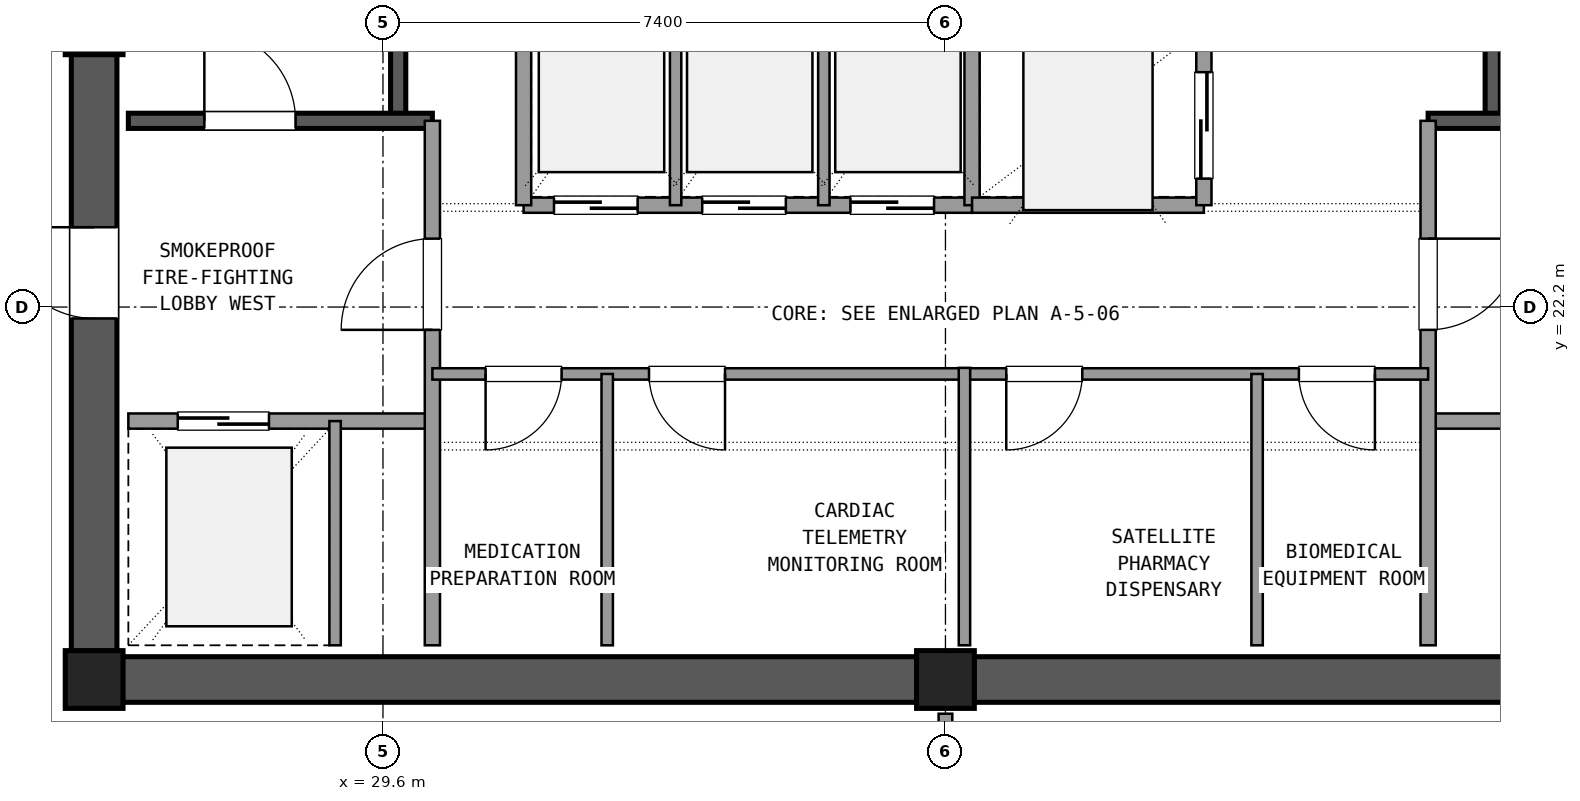
"""IFC4 building model, lengths in metres.
Left out: names, types, materials, properties, quantities, classifications, styles, units other than length and angle.
Written with IfcOpenShell. Run it as: python <this file> out.ifc"""

import sys

from ifc_helpers import new_model, si_unit, direction, frame, frame_2d, origin, origin_2d, place, context, subcontext, project, spatial, rectangle, extrude, element, fill, save


model = new_model("IFC4")
c1 = context("Model", 3, precision=1e-05, world=origin(), true_north=direction((0.0, 1.0)))
c2 = subcontext(c1, "Body", "Model", "MODEL_VIEW")
j1 = project(units=[si_unit("LENGTHUNIT", "METRE"), si_unit("PLANEANGLEUNIT", "RADIAN")], contexts=[c1])
p1 = place(None, origin())
s1 = spatial("IfcSite", under=j1, at=p1, CompositionType="ELEMENT")
p2 = place(p1, origin())
s2 = spatial("IfcBuilding", under=s1, at=p2, CompositionType="ELEMENT")
p3 = place(p2, frame((0.0, 0.0, 282.42)))
s3 = spatial("IfcBuildingStorey", under=s2, at=p3, CompositionType="ELEMENT", Elevation=282.42)
for number, where, z_axis, x_axis in (
    (1, (25.8, 17.3, 0.0), (0.0, 0.0, 1.0), (1.0, 0.0, 0.0)),
    (2, (37.0, 17.3, 0.0), (0.0, 0.0, 1.0), (1.0, 0.0, 0.0)),
    (3, (25.8, 25.9, 0.0), (0.0, 0.0, 1.0), (1.0, 0.0, 0.0)),
):
    element("IfcColumn", number, at=place(p3, frame(where, z_axis=z_axis, x_axis=x_axis)), inside=s3, PredefinedType="COLUMN", context=c2, shape_type="SweptSolid", body=[
        extrude(rectangle(XDim=0.76, YDim=0.76, at=origin_2d()), origin(), (0.0, 0.0, 1.0), 3.6),
    ])
for number, where, z_axis, x_axis in (
    (4, (26.175, 17.3, 0.0), (0.0, 0.0, 1.0), (1.0, 0.0, 0.0)),
    (5, (37.375, 17.3, 0.0), (0.0, 0.0, 1.0), (1.0, 0.0, 0.0)),
):
    element("IfcWall", number, at=place(p3, frame(where, z_axis=z_axis, x_axis=x_axis)), inside=s3, PredefinedType="SHEAR", context=c2, shape_type="SweptSolid", body=[
        extrude(rectangle(XDim=10.45, YDim=0.6, at=frame_2d((5.225, 0.0))), origin(), (0.0, 0.0, 1.0), 3.32),
    ])
p4 = place(p3, frame((25.8, 25.525, 0.0), z_axis=(0.0, 0.0, 1.0), x_axis=(0.0, -1.0, 0.0)))
e6 = element("IfcWall", 6, at=p4, inside=s3, PredefinedType="SHEAR", context=c2, shape_type="SweptSolid", body=[
    extrude(rectangle(XDim=7.85, YDim=0.6, at=frame_2d((3.925, 0.0))), origin(), (0.0, 0.0, 1.0), 3.32),
])
p5 = place(p4, frame((2.275, 0.0, 0.0)))
e7 = element("IfcOpeningElement", 7, at=p5, cuts=e6, PredefinedType="OPENING", context=c2, shape_type="SweptSolid", body=[
    extrude(rectangle(XDim=1.2, YDim=2.15, at=frame_2d((0.6, 1.075))), frame((0.0, 0.31, 0.0), z_axis=(0.0, -1.0, 0.0), x_axis=(1.0, 0.0, 0.0)), (0.0, 0.0, 1.0), 0.62),
])
p6 = place(p3, frame((29.8, 24.65, 0.0), z_axis=(0.0, 0.0, 1.0), x_axis=(0.0, 1.0, 0.0)))
e8 = element("IfcWall", 8, at=p6, inside=s3, PredefinedType="SHEAR", context=c2, shape_type="SweptSolid", body=[
    extrude(rectangle(XDim=9.4, YDim=0.2, at=frame_2d((4.7, 0.0))), origin(), (0.0, 0.0, 1.0), 3.32),
])
p7 = place(p3, frame((26.25, 24.65, 0.0), z_axis=(0.0, 0.0, 1.0), x_axis=(1.0, 0.0, 0.0)))
e9 = element("IfcWall", 9, at=p7, inside=s3, PredefinedType="SHEAR", context=c2, shape_type="SweptSolid", body=[
    extrude(rectangle(XDim=4.0, YDim=0.2, at=frame_2d((2.0, 0.0))), origin(), (0.0, 0.0, 1.0), 3.32),
])
p8 = place(p7, frame((1.0, 0.0, 0.0)))
e10 = element("IfcOpeningElement", 10, at=p8, cuts=e9, PredefinedType="OPENING", context=c2, shape_type="SweptSolid", body=[
    extrude(rectangle(XDim=1.2, YDim=2.15, at=frame_2d((0.6, 1.075))), frame((0.0, 0.11, 0.0), z_axis=(0.0, -1.0, 0.0), x_axis=(1.0, 0.0, 0.0)), (0.0, 0.0, 1.0), 0.22),
])
p9 = place(p3, frame((44.2, 24.65, 0.0), z_axis=(0.0, 0.0, 1.0), x_axis=(0.0, 1.0, 0.0)))
e11 = element("IfcWall", 11, at=p9, inside=s3, PredefinedType="SHEAR", context=c2, shape_type="SweptSolid", body=[
    extrude(rectangle(XDim=9.4, YDim=0.2, at=frame_2d((4.7, 0.0))), origin(), (0.0, 0.0, 1.0), 3.32),
])
p10 = place(p3, frame((43.35, 24.65, 0.0), z_axis=(0.0, 0.0, 1.0), x_axis=(1.0, 0.0, 0.0)))
e12 = element("IfcWall", 12, at=p10, inside=s3, PredefinedType="SHEAR", context=c2, shape_type="SweptSolid", body=[
    extrude(rectangle(XDim=4.4, YDim=0.2, at=frame_2d((2.2, 0.0))), origin(), (0.0, 0.0, 1.0), 3.32),
])
p11 = place(p10, frame((2.0, 0.0, 0.0)))
e13 = element("IfcOpeningElement", 13, at=p11, cuts=e12, PredefinedType="OPENING", context=c2, shape_type="SweptSolid", body=[
    extrude(rectangle(XDim=1.2, YDim=2.15, at=frame_2d((0.6, 1.075))), frame((0.0, 0.11, 0.0), z_axis=(0.0, -1.0, 0.0), x_axis=(1.0, 0.0, 0.0)), (0.0, 0.0, 1.0), 0.22),
])
p12 = place(p3, frame((26.25, 20.7, 0.0), z_axis=(0.0, 0.0, 1.0), x_axis=(1.0, 0.0, 0.0)))
e14 = element("IfcWall", 14, at=p12, inside=s3, PredefinedType="SOLIDWALL", context=c2, shape_type="SweptSolid", body=[
    extrude(rectangle(XDim=4.0, YDim=0.2, at=frame_2d((2.0, 0.0))), origin(), (0.0, 0.0, 1.0), 2.24),
])
p13 = place(p12, frame((0.65, 0.0, 0.0)))
e15 = element("IfcOpeningElement", 15, at=p13, cuts=e14, PredefinedType="OPENING", context=c2, shape_type="SweptSolid", body=[
    extrude(rectangle(XDim=1.2, YDim=2.15, at=frame_2d((0.6, 1.075))), frame((0.0, 0.11, 0.0), z_axis=(0.0, -1.0, 0.0), x_axis=(1.0, 0.0, 0.0)), (0.0, 0.0, 1.0), 0.22),
])
p14 = place(p3, frame((30.25, 17.75, 0.0), z_axis=(0.0, 0.0, 1.0), x_axis=(0.0, 1.0, 0.0)))
e16 = element("IfcWall", 16, at=p14, inside=s3, PredefinedType="SOLIDWALL", context=c2, shape_type="SweptSolid", body=[
    extrude(rectangle(XDim=6.9, YDim=0.2, at=frame_2d((3.45, 0.0))), origin(), (0.0, 0.0, 1.0), 2.24),
])
p15 = place(p14, frame((4.15, 0.0, 0.0)))
e17 = element("IfcOpeningElement", 17, at=p15, cuts=e16, PredefinedType="OPENING", context=c2, shape_type="SweptSolid", body=[
    extrude(rectangle(XDim=1.2, YDim=2.15, at=frame_2d((0.6, 1.075))), frame((0.0, 0.11, 0.0), z_axis=(0.0, -1.0, 0.0), x_axis=(1.0, 0.0, 0.0)), (0.0, 0.0, 1.0), 0.22),
])
p16 = place(p3, frame((28.97, 17.75, 0.0), z_axis=(0.0, 0.0, 1.0), x_axis=(0.0, 1.0, 0.0)))
e18 = element("IfcWall", 18, at=p16, inside=s3, PredefinedType="PARTITIONING", context=c2, shape_type="SweptSolid", body=[
    extrude(rectangle(XDim=2.95, YDim=0.15, at=frame_2d((1.475, 0.0))), origin(), (0.0, 0.0, 1.0), 2.24),
])
p17 = place(p3, frame((43.35, 20.7, 0.0), z_axis=(0.0, 0.0, 1.0), x_axis=(1.0, 0.0, 0.0)))
e19 = element("IfcWall", 19, at=p17, inside=s3, PredefinedType="SOLIDWALL", context=c2, shape_type="SweptSolid", body=[
    extrude(rectangle(XDim=4.4, YDim=0.2, at=frame_2d((2.2, 0.0))), origin(), (0.0, 0.0, 1.0), 2.24),
])
p18 = place(p17, frame((2.35, 0.0, 0.0)))
e20 = element("IfcOpeningElement", 20, at=p18, cuts=e19, PredefinedType="OPENING", context=c2, shape_type="SweptSolid", body=[
    extrude(rectangle(XDim=1.2, YDim=2.15, at=frame_2d((0.6, 1.075))), frame((0.0, 0.11, 0.0), z_axis=(0.0, -1.0, 0.0), x_axis=(1.0, 0.0, 0.0)), (0.0, 0.0, 1.0), 0.22),
])
p19 = place(p3, frame((43.35, 17.75, 0.0), z_axis=(0.0, 0.0, 1.0), x_axis=(0.0, 1.0, 0.0)))
e21 = element("IfcWall", 21, at=p19, inside=s3, PredefinedType="SOLIDWALL", context=c2, shape_type="SweptSolid", body=[
    extrude(rectangle(XDim=6.9, YDim=0.2, at=frame_2d((3.45, 0.0))), origin(), (0.0, 0.0, 1.0), 2.24),
])
p20 = place(p19, frame((4.15, 0.0, 0.0)))
e22 = element("IfcOpeningElement", 22, at=p20, cuts=e21, PredefinedType="OPENING", context=c2, shape_type="SweptSolid", body=[
    extrude(rectangle(XDim=1.2, YDim=2.15, at=frame_2d((0.6, 1.075))), frame((0.0, 0.11, 0.0), z_axis=(0.0, -1.0, 0.0), x_axis=(1.0, 0.0, 0.0)), (0.0, 0.0, 1.0), 0.22),
])
p21 = place(p3, frame((30.25, 21.32, 0.0), z_axis=(0.0, 0.0, 1.0), x_axis=(1.0, 0.0, 0.0)))
e23 = element("IfcWall", 23, at=p21, inside=s3, PredefinedType="PARTITIONING", context=c2, shape_type="SweptSolid", body=[
    extrude(rectangle(XDim=7.0, YDim=0.15, at=frame_2d((3.5, 0.0))), origin(), (0.0, 0.0, 1.0), 2.24),
])
p22 = place(p21, frame((0.7, 0.0, 0.0)))
e24 = element("IfcOpeningElement", 24, at=p22, cuts=e23, PredefinedType="OPENING", context=c2, shape_type="SweptSolid", body=[
    extrude(rectangle(XDim=1.0, YDim=2.15, at=frame_2d((0.5, 1.075))), frame((0.0, 0.085, 0.0), z_axis=(0.0, -1.0, 0.0), x_axis=(1.0, 0.0, 0.0)), (0.0, 0.0, 1.0), 0.17),
])
p23 = place(p21, frame((2.85, 0.0, 0.0)))
e25 = element("IfcOpeningElement", 25, at=p23, cuts=e23, PredefinedType="OPENING", context=c2, shape_type="SweptSolid", body=[
    extrude(rectangle(XDim=1.0, YDim=2.15, at=frame_2d((0.5, 1.075))), frame((0.0, 0.085, 0.0), z_axis=(0.0, -1.0, 0.0), x_axis=(1.0, 0.0, 0.0)), (0.0, 0.0, 1.0), 0.17),
])
p24 = place(p3, frame((32.55, 17.75, 0.0), z_axis=(0.0, 0.0, 1.0), x_axis=(0.0, 1.0, 0.0)))
e26 = element("IfcWall", 26, at=p24, inside=s3, PredefinedType="PARTITIONING", context=c2, shape_type="SweptSolid", body=[
    extrude(rectangle(XDim=3.57, YDim=0.15, at=frame_2d((1.785, 0.0))), origin(), (0.0, 0.0, 1.0), 2.24),
])
p25 = place(p3, frame((37.25, 21.32, 0.0), z_axis=(0.0, 0.0, 1.0), x_axis=(1.0, 0.0, 0.0)))
e27 = element("IfcWall", 27, at=p25, inside=s3, PredefinedType="PARTITIONING", context=c2, shape_type="SweptSolid", body=[
    extrude(rectangle(XDim=6.1, YDim=0.15, at=frame_2d((3.05, 0.0))), origin(), (0.0, 0.0, 1.0), 2.24),
])
p26 = place(p25, frame((0.55, 0.0, 0.0)))
e28 = element("IfcOpeningElement", 28, at=p26, cuts=e27, PredefinedType="OPENING", context=c2, shape_type="SweptSolid", body=[
    extrude(rectangle(XDim=1.0, YDim=2.15, at=frame_2d((0.5, 1.075))), frame((0.0, 0.085, 0.0), z_axis=(0.0, -1.0, 0.0), x_axis=(1.0, 0.0, 0.0)), (0.0, 0.0, 1.0), 0.17),
])
p27 = place(p25, frame((4.4, 0.0, 0.0)))
e29 = element("IfcOpeningElement", 29, at=p27, cuts=e27, PredefinedType="OPENING", context=c2, shape_type="SweptSolid", body=[
    extrude(rectangle(XDim=1.0, YDim=2.15, at=frame_2d((0.5, 1.075))), frame((0.0, 0.085, 0.0), z_axis=(0.0, -1.0, 0.0), x_axis=(1.0, 0.0, 0.0)), (0.0, 0.0, 1.0), 0.17),
])
p28 = place(p3, frame((41.1, 17.75, 0.0), z_axis=(0.0, 0.0, 1.0), x_axis=(0.0, 1.0, 0.0)))
e30 = element("IfcWall", 30, at=p28, inside=s3, PredefinedType="PARTITIONING", context=c2, shape_type="SweptSolid", body=[
    extrude(rectangle(XDim=3.57, YDim=0.15, at=frame_2d((1.785, 0.0))), origin(), (0.0, 0.0, 1.0), 2.24),
])
p29 = place(p3, frame((37.25, 17.75, 0.0), z_axis=(0.0, 0.0, 1.0), x_axis=(0.0, 1.0, 0.0)))
e31 = element("IfcWall", 31, at=p29, inside=s3, PredefinedType="PARTITIONING", context=c2, shape_type="SweptSolid", body=[
    extrude(rectangle(XDim=3.65, YDim=0.15, at=frame_2d((1.825, 0.0))), origin(), (0.0, 0.0, 1.0), 2.24),
])
p30 = place(p3, frame((31.45, 23.54, 0.0), z_axis=(0.0, 0.0, 1.0), x_axis=(1.0, 0.0, 0.0)))
e32 = element("IfcWall", 32, at=p30, inside=s3, PredefinedType="SOLIDWALL", context=c2, shape_type="SweptSolid", body=[
    extrude(rectangle(XDim=5.9, YDim=0.2, at=frame_2d((2.95, 0.0))), origin(), (0.0, 0.0, 1.0), 2.24),
])
p31 = place(p30, frame((0.4, 0.0, 0.0)))
e33 = element("IfcOpeningElement", 33, at=p31, cuts=e32, PredefinedType="OPENING", context=c2, shape_type="SweptSolid", body=[
    extrude(rectangle(XDim=1.1, YDim=2.15, at=frame_2d((0.55, 1.075))), frame((0.0, 0.11, 0.0), z_axis=(0.0, -1.0, 0.0), x_axis=(1.0, 0.0, 0.0)), (0.0, 0.0, 1.0), 0.22),
])
p32 = place(p30, frame((2.35, 0.0, 0.0)))
e34 = element("IfcOpeningElement", 34, at=p32, cuts=e32, PredefinedType="OPENING", context=c2, shape_type="SweptSolid", body=[
    extrude(rectangle(XDim=1.1, YDim=2.15, at=frame_2d((0.55, 1.075))), frame((0.0, 0.11, 0.0), z_axis=(0.0, -1.0, 0.0), x_axis=(1.0, 0.0, 0.0)), (0.0, 0.0, 1.0), 0.22),
])
p33 = place(p30, frame((4.3, 0.0, 0.0)))
e35 = element("IfcOpeningElement", 35, at=p33, cuts=e32, PredefinedType="OPENING", context=c2, shape_type="SweptSolid", body=[
    extrude(rectangle(XDim=1.1, YDim=2.15, at=frame_2d((0.55, 1.075))), frame((0.0, 0.11, 0.0), z_axis=(0.0, -1.0, 0.0), x_axis=(1.0, 0.0, 0.0)), (0.0, 0.0, 1.0), 0.22),
])
p34 = place(p3, frame((31.45, 23.54, 0.0), z_axis=(0.0, 0.0, 1.0), x_axis=(0.0, 1.0, 0.0)))
e36 = element("IfcWall", 36, at=p34, inside=s3, PredefinedType="SOLIDWALL", context=c2, shape_type="SweptSolid", body=[
    extrude(rectangle(XDim=2.81, YDim=0.2, at=frame_2d((1.405, 0.0))), origin(), (0.0, 0.0, 1.0), 2.24),
])
for number, where, z_axis, x_axis in (
    (37, (33.45, 23.54, 0.0), (0.0, 0.0, 1.0), (0.0, 1.0, 0.0)),
    (38, (35.4, 23.54, 0.0), (0.0, 0.0, 1.0), (0.0, 1.0, 0.0)),
):
    element("IfcWall", number, at=place(p3, frame(where, z_axis=z_axis, x_axis=x_axis)), inside=s3, PredefinedType="PARTITIONING", context=c2, shape_type="SweptSolid", body=[
        extrude(rectangle(XDim=2.81, YDim=0.15, at=frame_2d((1.405, 0.0))), origin(), (0.0, 0.0, 1.0), 2.24),
    ])
p35 = place(p3, frame((37.35, 23.54, 0.0), z_axis=(0.0, 0.0, 1.0), x_axis=(0.0, 1.0, 0.0)))
e39 = element("IfcWall", 39, at=p35, inside=s3, PredefinedType="SOLIDWALL", context=c2, shape_type="SweptSolid", body=[
    extrude(rectangle(XDim=6.82, YDim=0.2, at=frame_2d((3.41, 0.0))), origin(), (0.0, 0.0, 1.0), 2.24),
])
p36 = place(p3, frame((37.35, 23.54, 0.0), z_axis=(0.0, 0.0, 1.0), x_axis=(1.0, 0.0, 0.0)))
e40 = element("IfcWall", 40, at=p36, inside=s3, PredefinedType="SOLIDWALL", context=c2, shape_type="SweptSolid", body=[
    extrude(rectangle(XDim=3.05, YDim=0.2, at=frame_2d((1.525, 0.0))), origin(), (0.0, 0.0, 1.0), 2.24),
])
p37 = place(p3, frame((40.4, 23.54, 0.0), z_axis=(0.0, 0.0, 1.0), x_axis=(0.0, 1.0, 0.0)))
e41 = element("IfcWall", 41, at=p37, inside=s3, PredefinedType="SOLIDWALL", context=c2, shape_type="SweptSolid", body=[
    extrude(rectangle(XDim=6.82, YDim=0.2, at=frame_2d((3.41, 0.0))), origin(), (0.0, 0.0, 1.0), 2.24),
])
p38 = place(p37, frame((0.35, 0.0, 0.0)))
e42 = element("IfcOpeningElement", 42, at=p38, cuts=e41, PredefinedType="OPENING", context=c2, shape_type="SweptSolid", body=[
    extrude(rectangle(XDim=1.4, YDim=2.2, at=frame_2d((0.7, 1.1))), frame((0.0, 0.11, 0.0), z_axis=(0.0, -1.0, 0.0), x_axis=(1.0, 0.0, 0.0)), (0.0, 0.0, 1.0), 0.22),
])
p39 = place(p37, frame((2.65, 0.0, 0.0)))
e43 = element("IfcOpeningElement", 43, at=p39, cuts=e41, PredefinedType="OPENING", context=c2, shape_type="SweptSolid", body=[
    extrude(rectangle(XDim=1.4, YDim=2.2, at=frame_2d((0.7, 1.1))), frame((0.0, 0.11, 0.0), z_axis=(0.0, -1.0, 0.0), x_axis=(1.0, 0.0, 0.0)), (0.0, 0.0, 1.0), 0.22),
])
p40 = place(p37, frame((4.85, 0.0, 0.0)))
e44 = element("IfcOpeningElement", 44, at=p40, cuts=e41, PredefinedType="OPENING", context=c2, shape_type="SweptSolid", body=[
    extrude(rectangle(XDim=1.4, YDim=2.2, at=frame_2d((0.7, 1.1))), frame((0.0, 0.11, 0.0), z_axis=(0.0, -1.0, 0.0), x_axis=(1.0, 0.0, 0.0)), (0.0, 0.0, 1.0), 0.22),
])
p41 = place(p3, frame((37.0, 14.15, 0.0), z_axis=(0.0, 0.0, 1.0), x_axis=(0.0, 1.0, 0.0)))
e45 = element("IfcWall", 45, at=p41, inside=s3, PredefinedType="PARTITIONING", context=c2, shape_type="SweptSolid", body=[
    extrude(rectangle(XDim=2.7, YDim=0.18, at=frame_2d((1.35, 0.0))), origin(), (0.0, 0.0, 1.0), 2.24),
])
p42 = place(p41, frame((0.35, 0.0, 0.0)))
e46 = element("IfcOpeningElement", 46, at=p42, cuts=e45, PredefinedType="OPENING", context=c2, shape_type="SweptSolid", body=[
    extrude(rectangle(XDim=2.0, YDim=2.2, at=frame_2d((1.0, 1.1))), frame((0.0, 0.1, 0.0), z_axis=(0.0, -1.0, 0.0), x_axis=(1.0, 0.0, 0.0)), (0.0, 0.0, 1.0), 0.2),
])
p43 = place(p8, origin())
e47 = element("IfcDoor", 47, at=p43, inside=s3, OperationType="SINGLE_SWING_LEFT", PredefinedType="DOOR", context=c2, shape_type="SweptSolid", body=[
    extrude(rectangle(XDim=1.2, YDim=2.15, at=frame_2d((0.6, 1.075))), frame((0.0, 0.025, 0.0), z_axis=(0.0, -1.0, 0.0), x_axis=(1.0, 0.0, 0.0)), (0.0, 0.0, 1.0), 0.05),
])
fill(e10, e47)
p44 = place(p13, origin())
e48 = element("IfcDoor", 48, at=p44, inside=s3, OperationType="SLIDING_TO_LEFT", PredefinedType="DOOR", context=c2, shape_type="SweptSolid", body=[
    extrude(rectangle(XDim=1.2, YDim=2.15, at=frame_2d((0.6, 1.075))), frame((0.0, 0.025, 0.0), z_axis=(0.0, -1.0, 0.0), x_axis=(1.0, 0.0, 0.0)), (0.0, 0.0, 1.0), 0.05),
])
fill(e15, e48)
p45 = place(p15, origin())
e49 = element("IfcDoor", 49, at=p45, inside=s3, OperationType="SINGLE_SWING_LEFT", PredefinedType="DOOR", context=c2, shape_type="SweptSolid", body=[
    extrude(rectangle(XDim=1.2, YDim=2.15, at=frame_2d((0.6, 1.075))), frame((0.0, 0.025, 0.0), z_axis=(0.0, -1.0, 0.0), x_axis=(1.0, 0.0, 0.0)), (0.0, 0.0, 1.0), 0.05),
])
fill(e17, e49)
p46 = place(p20, frame((1.2, 0.0, 0.0), z_axis=(0.0, 0.0, 1.0), x_axis=(-1.0, 0.0, 0.0)))
e50 = element("IfcDoor", 50, at=p46, inside=s3, OperationType="SINGLE_SWING_RIGHT", PredefinedType="DOOR", context=c2, shape_type="SweptSolid", body=[
    extrude(rectangle(XDim=1.2, YDim=2.15, at=frame_2d((0.6, 1.075))), frame((0.0, 0.025, 0.0), z_axis=(0.0, -1.0, 0.0), x_axis=(1.0, 0.0, 0.0)), (0.0, 0.0, 1.0), 0.05),
])
fill(e22, e50)
p47 = place(p5, frame((1.2, 0.0, 0.0), z_axis=(0.0, 0.0, 1.0), x_axis=(-1.0, 0.0, 0.0)))
e51 = element("IfcDoor", 51, at=p47, inside=s3, OperationType="SINGLE_SWING_LEFT", PredefinedType="DOOR", context=c2, shape_type="SweptSolid", body=[
    extrude(rectangle(XDim=1.2, YDim=2.15, at=frame_2d((0.6, 1.075))), frame((0.0, 0.025, 0.0), z_axis=(0.0, -1.0, 0.0), x_axis=(1.0, 0.0, 0.0)), (0.0, 0.0, 1.0), 0.05),
])
fill(e7, e51)
p48 = place(p22, frame((1.0, 0.0, 0.0), z_axis=(0.0, 0.0, 1.0), x_axis=(-1.0, 0.0, 0.0)))
e52 = element("IfcDoor", 52, at=p48, inside=s3, OperationType="SINGLE_SWING_LEFT", PredefinedType="DOOR", context=c2, shape_type="SweptSolid", body=[
    extrude(rectangle(XDim=1.0, YDim=2.15, at=frame_2d((0.5, 1.075))), frame((0.0, 0.025, 0.0), z_axis=(0.0, -1.0, 0.0), x_axis=(1.0, 0.0, 0.0)), (0.0, 0.0, 1.0), 0.05),
])
fill(e24, e52)
p49 = place(p23, frame((1.0, 0.0, 0.0), z_axis=(0.0, 0.0, 1.0), x_axis=(-1.0, 0.0, 0.0)))
e53 = element("IfcDoor", 53, at=p49, inside=s3, OperationType="SINGLE_SWING_RIGHT", PredefinedType="DOOR", context=c2, shape_type="SweptSolid", body=[
    extrude(rectangle(XDim=1.0, YDim=2.15, at=frame_2d((0.5, 1.075))), frame((0.0, 0.025, 0.0), z_axis=(0.0, -1.0, 0.0), x_axis=(1.0, 0.0, 0.0)), (0.0, 0.0, 1.0), 0.05),
])
fill(e25, e53)
p50 = place(p26, frame((1.0, 0.0, 0.0), z_axis=(0.0, 0.0, 1.0), x_axis=(-1.0, 0.0, 0.0)))
e54 = element("IfcDoor", 54, at=p50, inside=s3, OperationType="SINGLE_SWING_LEFT", PredefinedType="DOOR", context=c2, shape_type="SweptSolid", body=[
    extrude(rectangle(XDim=1.0, YDim=2.15, at=frame_2d((0.5, 1.075))), frame((0.0, 0.025, 0.0), z_axis=(0.0, -1.0, 0.0), x_axis=(1.0, 0.0, 0.0)), (0.0, 0.0, 1.0), 0.05),
])
fill(e28, e54)
p51 = place(p27, frame((1.0, 0.0, 0.0), z_axis=(0.0, 0.0, 1.0), x_axis=(-1.0, 0.0, 0.0)))
e55 = element("IfcDoor", 55, at=p51, inside=s3, OperationType="SINGLE_SWING_RIGHT", PredefinedType="DOOR", context=c2, shape_type="SweptSolid", body=[
    extrude(rectangle(XDim=1.0, YDim=2.15, at=frame_2d((0.5, 1.075))), frame((0.0, 0.025, 0.0), z_axis=(0.0, -1.0, 0.0), x_axis=(1.0, 0.0, 0.0)), (0.0, 0.0, 1.0), 0.05),
])
fill(e29, e55)
p52 = place(p31, origin())
e56 = element("IfcDoor", 56, at=p52, inside=s3, OperationType="SLIDING_TO_RIGHT", PredefinedType="DOOR", context=c2, shape_type="SweptSolid", body=[
    extrude(rectangle(XDim=1.1, YDim=2.15, at=frame_2d((0.55, 1.075))), frame((0.0, 0.025, 0.0), z_axis=(0.0, -1.0, 0.0), x_axis=(1.0, 0.0, 0.0)), (0.0, 0.0, 1.0), 0.05),
])
fill(e33, e56)
p53 = place(p32, origin())
e57 = element("IfcDoor", 57, at=p53, inside=s3, OperationType="SLIDING_TO_RIGHT", PredefinedType="DOOR", context=c2, shape_type="SweptSolid", body=[
    extrude(rectangle(XDim=1.1, YDim=2.15, at=frame_2d((0.55, 1.075))), frame((0.0, 0.025, 0.0), z_axis=(0.0, -1.0, 0.0), x_axis=(1.0, 0.0, 0.0)), (0.0, 0.0, 1.0), 0.05),
])
fill(e34, e57)
p54 = place(p33, origin())
e58 = element("IfcDoor", 58, at=p54, inside=s3, OperationType="SLIDING_TO_RIGHT", PredefinedType="DOOR", context=c2, shape_type="SweptSolid", body=[
    extrude(rectangle(XDim=1.1, YDim=2.15, at=frame_2d((0.55, 1.075))), frame((0.0, 0.025, 0.0), z_axis=(0.0, -1.0, 0.0), x_axis=(1.0, 0.0, 0.0)), (0.0, 0.0, 1.0), 0.05),
])
fill(e35, e58)
p55 = place(p38, origin())
e59 = element("IfcDoor", 59, at=p55, inside=s3, OperationType="SLIDING_TO_LEFT", PredefinedType="DOOR", context=c2, shape_type="SweptSolid", body=[
    extrude(rectangle(XDim=1.4, YDim=2.2, at=frame_2d((0.7, 1.1))), frame((0.0, 0.025, 0.0), z_axis=(0.0, -1.0, 0.0), x_axis=(1.0, 0.0, 0.0)), (0.0, 0.0, 1.0), 0.05),
])
fill(e42, e59)
save(model, sys.argv[1])
